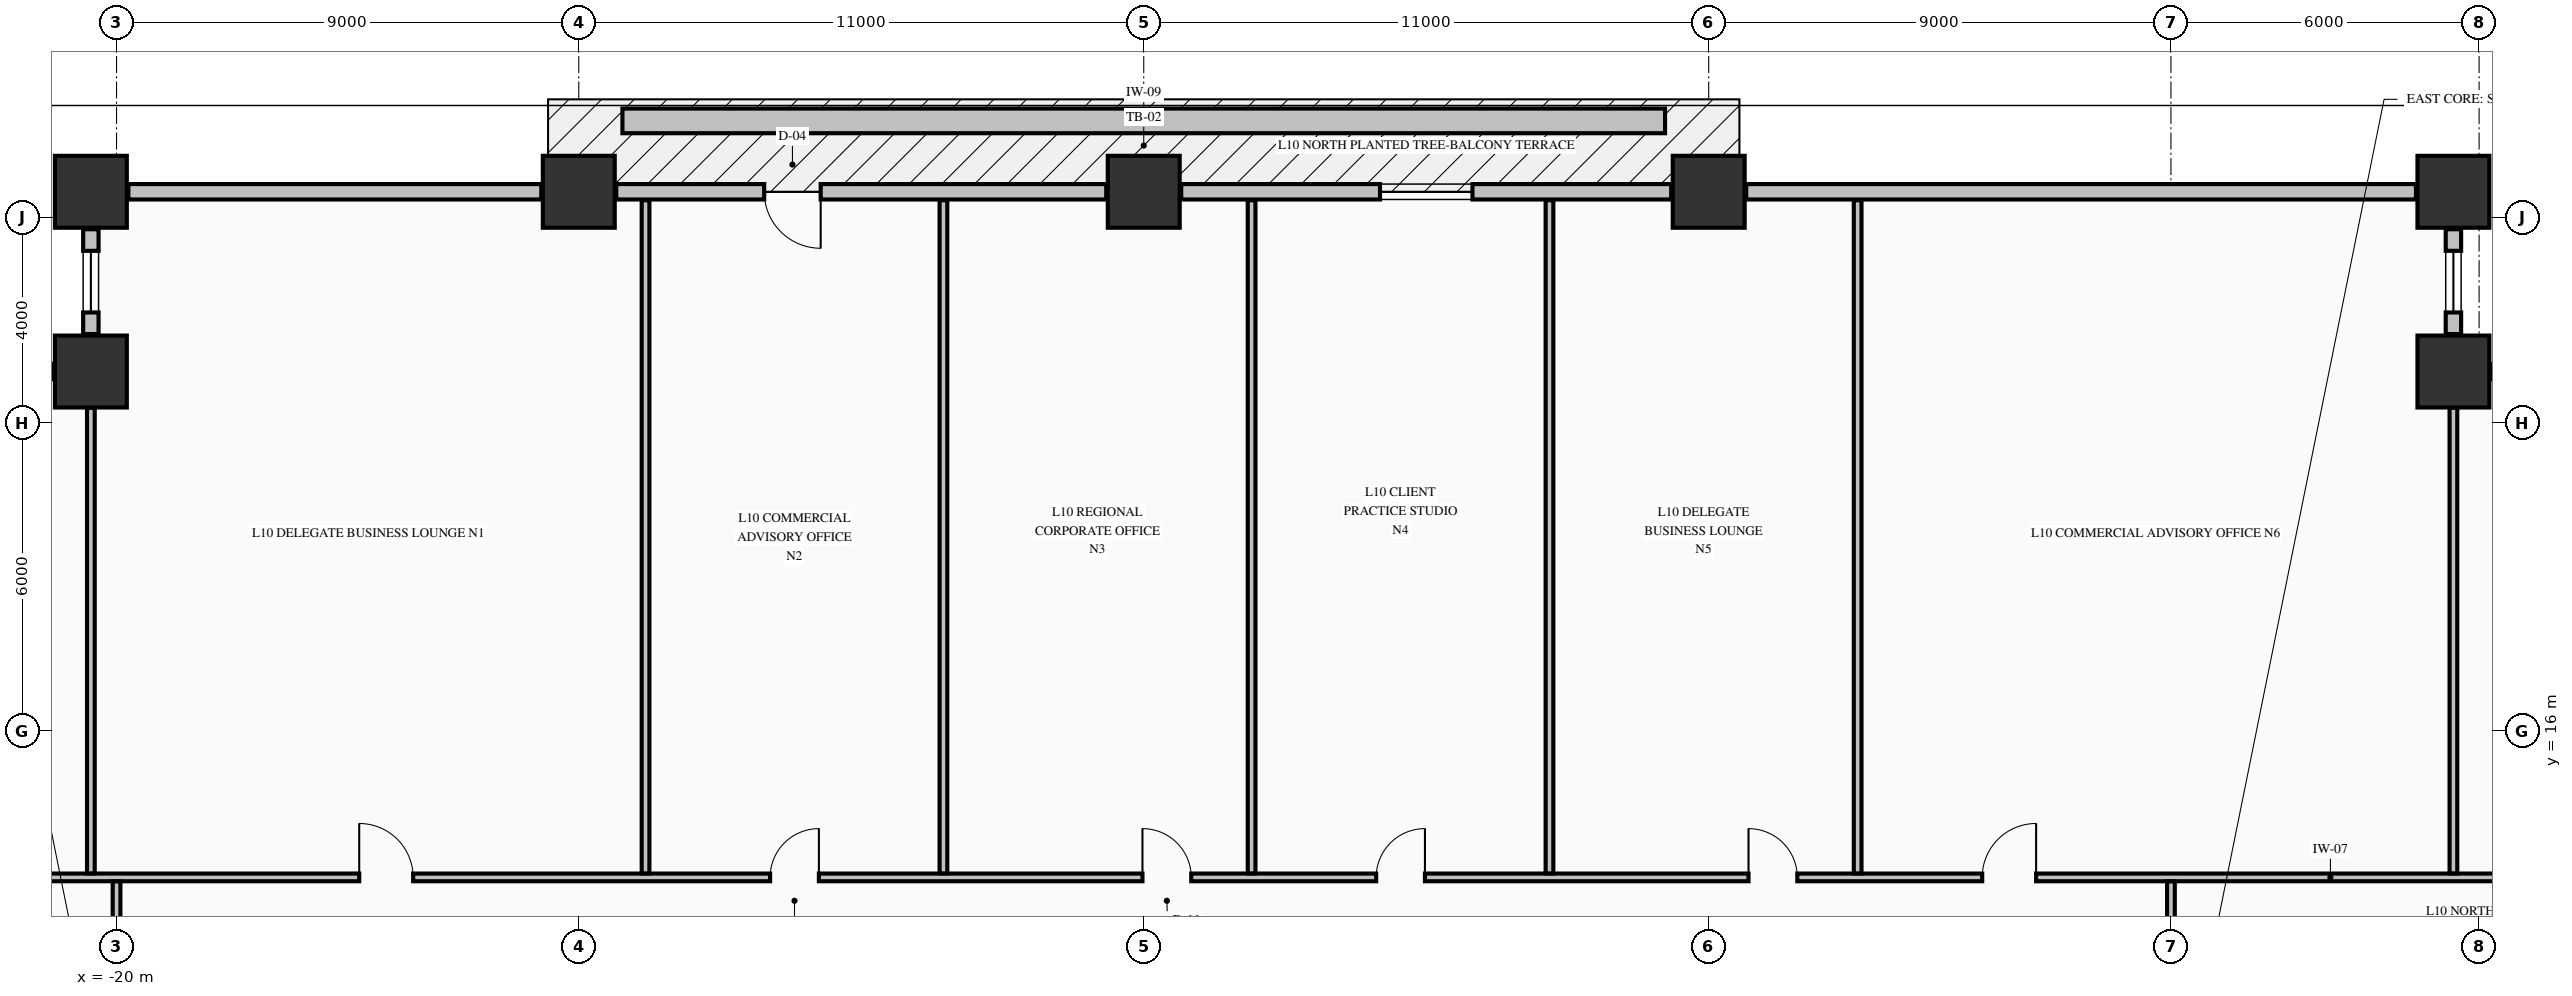
"""IFC4 building model, lengths in metres.
Left out: names, types, materials, properties, quantities, classifications, styles, units other than length and angle.
Written with IfcOpenShell. Run it as: python <this file> out.ifc"""

import sys

from ifc_helpers import new_model, si_unit, direction, frame, frame_2d, origin, origin_2d, place, context, subcontext, project, spatial, rectangle, extrude, element, fill, save


model = new_model("IFC4")
c1 = context("Model", 3, precision=1e-05, world=origin(), true_north=direction((0.0, 1.0)))
c2 = subcontext(c1, "Body", "Model", "MODEL_VIEW")
j1 = project(units=[si_unit("LENGTHUNIT", "METRE"), si_unit("PLANEANGLEUNIT", "RADIAN")], contexts=[c1])
p1 = place(None, origin())
s1 = spatial("IfcSite", under=j1, at=p1, CompositionType="ELEMENT")
p2 = place(p1, origin())
s2 = spatial("IfcBuilding", under=s1, at=p2, CompositionType="ELEMENT")
p3 = place(p2, frame((0.0, 0.0, 45.05)))
s3 = spatial("IfcBuildingStorey", under=s2, at=p3, CompositionType="ELEMENT", Elevation=45.05)
for number, where, z_axis, x_axis in (
    (1, (-20.5, 26.5, -0.25), (0.0, 0.0, 1.0), (1.0, 0.0, 0.0)),
    (2, (-11.0, 26.5, -0.25), (0.0, 0.0, 1.0), (1.0, 0.0, 0.0)),
    (3, (0.0, 26.5, -0.25), (0.0, 0.0, 1.0), (1.0, 0.0, 0.0)),
    (4, (11.0, 26.5, -0.25), (0.0, 0.0, 1.0), (1.0, 0.0, 0.0)),
    (5, (25.5, 26.5, -0.25), (0.0, 0.0, 1.0), (1.0, 0.0, 0.0)),
    (6, (25.5, 23.0, -0.25), (0.0, 0.0, 1.0), (1.0, 0.0, 0.0)),
    (7, (-20.5, 23.0, -0.25), (0.0, 0.0, 1.0), (1.0, 0.0, 0.0)),
):
    element("IfcColumn", number, at=place(p3, frame(where, z_axis=z_axis, x_axis=x_axis)), inside=s3, PredefinedType="COLUMN", context=c2, shape_type="SweptSolid", body=[
        extrude(rectangle(XDim=1.4, YDim=1.4, at=origin_2d()), origin(), (0.0, 0.0, 1.0), 3.57),
    ])
p4 = place(p3, frame((28.27, 23.0, 0.0), z_axis=(0.0, 0.0, 1.0), x_axis=(-1.0, 0.0, 0.0)))
e8 = element("IfcWall", 8, at=p4, inside=s3, PredefinedType="STANDARD", context=c2, shape_type="SweptSolid", body=[
    extrude(rectangle(XDim=2.04, YDim=0.3, at=frame_2d((1.02, 0.0))), origin(), (0.0, 0.0, 1.0), 2.712),
])
p5 = place(p4, frame((0.42, 0.0, 0.82)))
e9 = element("IfcOpeningElement", 9, at=p5, cuts=e8, PredefinedType="OPENING", context=c2, shape_type="SweptSolid", body=[
    extrude(rectangle(XDim=1.2, YDim=1.65, at=frame_2d((0.6, 0.825))), frame((0.0, 0.16, 0.0), z_axis=(0.0, -1.0, 0.0), x_axis=(1.0, 0.0, 0.0)), (0.0, 0.0, 1.0), 0.32),
])
p6 = place(p3, frame((25.5, 23.73, 0.0), z_axis=(0.0, 0.0, 1.0), x_axis=(0.0, 1.0, 0.0)))
e10 = element("IfcWall", 10, at=p6, inside=s3, PredefinedType="STANDARD", context=c2, shape_type="SweptSolid", body=[
    extrude(rectangle(XDim=2.04, YDim=0.3, at=frame_2d((1.02, 0.0))), origin(), (0.0, 0.0, 1.0), 2.712),
])
p7 = place(p6, frame((0.42, 0.0, 0.82)))
e11 = element("IfcOpeningElement", 11, at=p7, cuts=e10, PredefinedType="OPENING", context=c2, shape_type="SweptSolid", body=[
    extrude(rectangle(XDim=1.2, YDim=1.65, at=frame_2d((0.6, 0.825))), frame((0.0, 0.16, 0.0), z_axis=(0.0, -1.0, 0.0), x_axis=(1.0, 0.0, 0.0)), (0.0, 0.0, 1.0), 0.32),
])
p8 = place(p3, frame((-20.5, 25.77, 0.0), z_axis=(0.0, 0.0, 1.0), x_axis=(0.0, -1.0, 0.0)))
e12 = element("IfcWall", 12, at=p8, inside=s3, PredefinedType="STANDARD", context=c2, shape_type="SweptSolid", body=[
    extrude(rectangle(XDim=2.04, YDim=0.3, at=frame_2d((1.02, 0.0))), origin(), (0.0, 0.0, 1.0), 2.712),
])
p9 = place(p8, frame((0.42, 0.0, 0.82)))
e13 = element("IfcOpeningElement", 13, at=p9, cuts=e12, PredefinedType="OPENING", context=c2, shape_type="SweptSolid", body=[
    extrude(rectangle(XDim=1.2, YDim=1.65, at=frame_2d((0.6, 0.825))), frame((0.0, 0.16, 0.0), z_axis=(0.0, -1.0, 0.0), x_axis=(1.0, 0.0, 0.0)), (0.0, 0.0, 1.0), 0.32),
])
p10 = place(p3, frame((-21.23, 23.0, 0.0), z_axis=(0.0, 0.0, 1.0), x_axis=(-1.0, 0.0, 0.0)))
e14 = element("IfcWall", 14, at=p10, inside=s3, PredefinedType="STANDARD", context=c2, shape_type="SweptSolid", body=[
    extrude(rectangle(XDim=2.04, YDim=0.3, at=frame_2d((1.02, 0.0))), origin(), (0.0, 0.0, 1.0), 2.712),
])
p11 = place(p10, frame((0.42, 0.0, 0.82)))
e15 = element("IfcOpeningElement", 15, at=p11, cuts=e14, PredefinedType="OPENING", context=c2, shape_type="SweptSolid", body=[
    extrude(rectangle(XDim=1.2, YDim=1.65, at=frame_2d((0.6, 0.825))), frame((0.0, 0.16, 0.0), z_axis=(0.0, -1.0, 0.0), x_axis=(1.0, 0.0, 0.0)), (0.0, 0.0, 1.0), 0.32),
])
p12 = place(p3, frame((-11.73, 26.5, 0.0), z_axis=(0.0, 0.0, 1.0), x_axis=(-1.0, 0.0, 0.0)))
e16 = element("IfcWall", 16, at=p12, inside=s3, PredefinedType="STANDARD", context=c2, shape_type="SweptSolid", body=[
    extrude(rectangle(XDim=8.04, YDim=0.3, at=frame_2d((4.02, 0.0))), origin(), (0.0, 0.0, 1.0), 2.712),
])
p13 = place(p3, frame((-0.73, 26.5, 0.0), z_axis=(0.0, 0.0, 1.0), x_axis=(-1.0, 0.0, 0.0)))
e17 = element("IfcWall", 17, at=p13, inside=s3, PredefinedType="STANDARD", context=c2, shape_type="SweptSolid", body=[
    extrude(rectangle(XDim=9.54, YDim=0.3, at=frame_2d((4.77, 0.0))), origin(), (0.0, 0.0, 1.0), 2.712),
])
p14 = place(p13, frame((5.56, 0.0, 0.0)))
e18 = element("IfcOpeningElement", 18, at=p14, cuts=e17, PredefinedType="OPENING", context=c2, shape_type="SweptSolid", body=[
    extrude(rectangle(XDim=1.1, YDim=2.15, at=frame_2d((0.55, 1.075))), frame((0.0, 0.16, 0.0), z_axis=(0.0, -1.0, 0.0), x_axis=(1.0, 0.0, 0.0)), (0.0, 0.0, 1.0), 0.32),
])
p15 = place(p3, frame((10.27, 26.5, 0.0), z_axis=(0.0, 0.0, 1.0), x_axis=(-1.0, 0.0, 0.0)))
e19 = element("IfcWall", 19, at=p15, inside=s3, PredefinedType="STANDARD", context=c2, shape_type="SweptSolid", body=[
    extrude(rectangle(XDim=9.54, YDim=0.3, at=frame_2d((4.77, 0.0))), origin(), (0.0, 0.0, 1.0), 2.712),
])
p16 = place(p15, frame((3.87, 0.0, 0.78)))
e20 = element("IfcOpeningElement", 20, at=p16, cuts=e19, PredefinedType="OPENING", context=c2, shape_type="SweptSolid", body=[
    extrude(rectangle(XDim=1.8, YDim=1.72, at=frame_2d((0.9, 0.86))), frame((0.0, 0.16, 0.0), z_axis=(0.0, -1.0, 0.0), x_axis=(1.0, 0.0, 0.0)), (0.0, 0.0, 1.0), 0.32),
])
p17 = place(p3, frame((24.77, 26.5, 0.0), z_axis=(0.0, 0.0, 1.0), x_axis=(-1.0, 0.0, 0.0)))
e21 = element("IfcWall", 21, at=p17, inside=s3, PredefinedType="STANDARD", context=c2, shape_type="SweptSolid", body=[
    extrude(rectangle(XDim=13.04, YDim=0.3, at=frame_2d((6.52, 0.0))), origin(), (0.0, 0.0, 1.0), 2.712),
])
p18 = place(p3, frame((-23.835, 13.15, 0.0), z_axis=(0.0, 0.0, 1.0), x_axis=(1.0, 0.0, 0.0)))
e22 = element("IfcWall", 22, at=p18, inside=s3, PredefinedType="PARTITIONING", context=c2, shape_type="SweptSolid", body=[
    extrude(rectangle(XDim=52.67, YDim=0.15, at=frame_2d((26.335, 0.0))), origin(), (0.0, 0.0, 1.0), 3.32),
])
p19 = place(p18, frame((8.56, 0.0, 0.0)))
e23 = element("IfcOpeningElement", 23, at=p19, cuts=e22, PredefinedType="OPENING", context=c2, shape_type="SweptSolid", body=[
    extrude(rectangle(XDim=1.05, YDim=2.15, at=frame_2d((0.525, 1.075))), frame((0.0, 0.085, 0.0), z_axis=(0.0, -1.0, 0.0), x_axis=(1.0, 0.0, 0.0)), (0.0, 0.0, 1.0), 0.17),
])
p20 = place(p18, frame((16.56, 0.0, 0.0)))
e24 = element("IfcOpeningElement", 24, at=p20, cuts=e22, PredefinedType="OPENING", context=c2, shape_type="SweptSolid", body=[
    extrude(rectangle(XDim=0.95, YDim=2.15, at=frame_2d((0.475, 1.075))), frame((0.0, 0.085, 0.0), z_axis=(0.0, -1.0, 0.0), x_axis=(1.0, 0.0, 0.0)), (0.0, 0.0, 1.0), 0.17),
])
p21 = place(p18, frame((23.81, 0.0, 0.0)))
e25 = element("IfcOpeningElement", 25, at=p21, cuts=e22, PredefinedType="OPENING", context=c2, shape_type="SweptSolid", body=[
    extrude(rectangle(XDim=0.95, YDim=2.15, at=frame_2d((0.475, 1.075))), frame((0.0, 0.085, 0.0), z_axis=(0.0, -1.0, 0.0), x_axis=(1.0, 0.0, 0.0)), (0.0, 0.0, 1.0), 0.17),
])
p22 = place(p18, frame((28.36, 0.0, 0.0)))
e26 = element("IfcOpeningElement", 26, at=p22, cuts=e22, PredefinedType="OPENING", context=c2, shape_type="SweptSolid", body=[
    extrude(rectangle(XDim=0.95, YDim=2.15, at=frame_2d((0.475, 1.075))), frame((0.0, 0.085, 0.0), z_axis=(0.0, -1.0, 0.0), x_axis=(1.0, 0.0, 0.0)), (0.0, 0.0, 1.0), 0.17),
])
p23 = place(p18, frame((35.61, 0.0, 0.0)))
e27 = element("IfcOpeningElement", 27, at=p23, cuts=e22, PredefinedType="OPENING", context=c2, shape_type="SweptSolid", body=[
    extrude(rectangle(XDim=0.95, YDim=2.15, at=frame_2d((0.475, 1.075))), frame((0.0, 0.085, 0.0), z_axis=(0.0, -1.0, 0.0), x_axis=(1.0, 0.0, 0.0)), (0.0, 0.0, 1.0), 0.17),
])
p24 = place(p18, frame((40.16, 0.0, 0.0)))
e28 = element("IfcOpeningElement", 28, at=p24, cuts=e22, PredefinedType="OPENING", context=c2, shape_type="SweptSolid", body=[
    extrude(rectangle(XDim=1.05, YDim=2.15, at=frame_2d((0.525, 1.075))), frame((0.0, 0.085, 0.0), z_axis=(0.0, -1.0, 0.0), x_axis=(1.0, 0.0, 0.0)), (0.0, 0.0, 1.0), 0.17),
])
p25 = place(p3, frame((-20.5, 13.228, 0.0), z_axis=(0.0, 0.0, 1.0), x_axis=(0.0, 1.0, 0.0)))
e29 = element("IfcWall", 29, at=p25, inside=s3, PredefinedType="PARTITIONING", context=c2, shape_type="SweptSolid", body=[
    extrude(rectangle(XDim=9.066, YDim=0.15, at=frame_2d((4.533, 0.0))), origin(), (0.0, 0.0, 1.0), 3.32),
])
p26 = place(p3, frame((-20.0, 11.106, 0.0), z_axis=(0.0, 0.0, 1.0), x_axis=(0.0, 1.0, 0.0)))
e30 = element("IfcWall", 30, at=p26, inside=s3, PredefinedType="PARTITIONING", context=c2, shape_type="SweptSolid", body=[
    extrude(rectangle(XDim=1.966, YDim=0.15, at=frame_2d((0.983, 0.0))), origin(), (0.0, 0.0, 1.0), 3.32),
])
p27 = place(p26, frame((0.239, 0.0, 0.0)))
e31 = element("IfcOpeningElement", 31, at=p27, cuts=e30, PredefinedType="OPENING", context=c2, shape_type="SweptSolid", body=[
    extrude(rectangle(XDim=0.95, YDim=2.15, at=frame_2d((0.475, 1.075))), frame((0.0, 0.085, 0.0), z_axis=(0.0, -1.0, 0.0), x_axis=(1.0, 0.0, 0.0)), (0.0, 0.0, 1.0), 0.17),
])
for number, where, z_axis, x_axis in (
    (32, (-9.7, 13.228, 0.0), (0.0, 0.0, 1.0), (0.0, 1.0, 0.0)),
    (33, (-3.9, 13.228, 0.0), (0.0, 0.0, 1.0), (0.0, 1.0, 0.0)),
    (34, (2.1, 13.228, 0.0), (0.0, 0.0, 1.0), (0.0, 1.0, 0.0)),
    (35, (7.9, 13.228, 0.0), (0.0, 0.0, 1.0), (0.0, 1.0, 0.0)),
    (36, (13.9, 13.228, 0.0), (0.0, 0.0, 1.0), (0.0, 1.0, 0.0)),
):
    element("IfcWall", number, at=place(p3, frame(where, z_axis=z_axis, x_axis=x_axis)), inside=s3, PredefinedType="PARTITIONING", context=c2, shape_type="SweptSolid", body=[
        extrude(rectangle(XDim=13.107, YDim=0.15, at=frame_2d((6.553, 0.0))), origin(), (0.0, 0.0, 1.0), 3.32),
    ])
p28 = place(p3, frame((20.0, 11.106, 0.0), z_axis=(0.0, 0.0, 1.0), x_axis=(0.0, 1.0, 0.0)))
e37 = element("IfcWall", 37, at=p28, inside=s3, PredefinedType="PARTITIONING", context=c2, shape_type="SweptSolid", body=[
    extrude(rectangle(XDim=1.966, YDim=0.15, at=frame_2d((0.983, 0.0))), origin(), (0.0, 0.0, 1.0), 2.66),
])
p29 = place(p28, frame((0.239, 0.0, 0.0)))
e38 = element("IfcOpeningElement", 38, at=p29, cuts=e37, PredefinedType="OPENING", context=c2, shape_type="SweptSolid", body=[
    extrude(rectangle(XDim=0.95, YDim=2.15, at=frame_2d((0.475, 1.075))), frame((0.0, 0.085, 0.0), z_axis=(0.0, -1.0, 0.0), x_axis=(1.0, 0.0, 0.0)), (0.0, 0.0, 1.0), 0.17),
])
p30 = place(p3, frame((25.5, 13.228, 0.0), z_axis=(0.0, 0.0, 1.0), x_axis=(0.0, 1.0, 0.0)))
e39 = element("IfcWall", 39, at=p30, inside=s3, PredefinedType="PARTITIONING", context=c2, shape_type="SweptSolid", body=[
    extrude(rectangle(XDim=9.066, YDim=0.15, at=frame_2d((4.533, 0.0))), origin(), (0.0, 0.0, 1.0), 3.32),
])
p31 = place(p3, frame((-10.15, 27.88, -0.04), z_axis=(0.0, 0.0, 1.0), x_axis=(1.0, 0.0, 0.0)))
e40 = element("IfcWall", 40, at=p31, inside=s3, PredefinedType="PARAPET", context=c2, shape_type="SweptSolid", body=[
    extrude(rectangle(XDim=20.3, YDim=0.48, at=frame_2d((10.15, 0.0))), origin(), (0.0, 0.0, 1.0), 0.52),
])
p32 = place(p7, origin())
e41 = element("IfcWindow", 41, at=p32, inside=s3, PartitioningType="SINGLE_PANEL", PredefinedType="WINDOW", context=c2, shape_type="SweptSolid", body=[
    extrude(rectangle(XDim=1.2, YDim=1.65, at=frame_2d((0.6, 0.825))), frame((0.0, 0.03, 0.0), z_axis=(0.0, -1.0, 0.0), x_axis=(1.0, 0.0, 0.0)), (0.0, 0.0, 1.0), 0.06),
])
fill(e11, e41)
p33 = place(p9, origin())
e42 = element("IfcWindow", 42, at=p33, inside=s3, PartitioningType="SINGLE_PANEL", PredefinedType="WINDOW", context=c2, shape_type="SweptSolid", body=[
    extrude(rectangle(XDim=1.2, YDim=1.65, at=frame_2d((0.6, 0.825))), frame((0.0, 0.03, 0.0), z_axis=(0.0, -1.0, 0.0), x_axis=(1.0, 0.0, 0.0)), (0.0, 0.0, 1.0), 0.06),
])
fill(e13, e42)
p34 = place(p14, origin())
e43 = element("IfcDoor", 43, at=p34, inside=s3, OperationType="SINGLE_SWING_LEFT", PredefinedType="DOOR", context=c2, shape_type="SweptSolid", body=[
    extrude(rectangle(XDim=1.1, YDim=2.15, at=frame_2d((0.55, 1.075))), frame((0.0, 0.025, 0.0), z_axis=(0.0, -1.0, 0.0), x_axis=(1.0, 0.0, 0.0)), (0.0, 0.0, 1.0), 0.05),
])
fill(e18, e43)
p35 = place(p16, origin())
e44 = element("IfcWindow", 44, at=p35, inside=s3, PartitioningType="SINGLE_PANEL", PredefinedType="WINDOW", context=c2, shape_type="SweptSolid", body=[
    extrude(rectangle(XDim=1.8, YDim=1.72, at=frame_2d((0.9, 0.86))), frame((0.0, 0.03, 0.0), z_axis=(0.0, -1.0, 0.0), x_axis=(1.0, 0.0, 0.0)), (0.0, 0.0, 1.0), 0.06),
])
fill(e20, e44)
p36 = place(p19, origin())
e45 = element("IfcDoor", 45, at=p36, inside=s3, OperationType="SINGLE_SWING_LEFT", PredefinedType="DOOR", context=c2, shape_type="SweptSolid", body=[
    extrude(rectangle(XDim=1.05, YDim=2.15, at=frame_2d((0.525, 1.075))), frame((0.0, 0.025, 0.0), z_axis=(0.0, -1.0, 0.0), x_axis=(1.0, 0.0, 0.0)), (0.0, 0.0, 1.0), 0.05),
])
fill(e23, e45)
p37 = place(p20, origin())
e46 = element("IfcDoor", 46, at=p37, inside=s3, OperationType="SINGLE_SWING_RIGHT", PredefinedType="DOOR", context=c2, shape_type="SweptSolid", body=[
    extrude(rectangle(XDim=0.95, YDim=2.15, at=frame_2d((0.475, 1.075))), frame((0.0, 0.025, 0.0), z_axis=(0.0, -1.0, 0.0), x_axis=(1.0, 0.0, 0.0)), (0.0, 0.0, 1.0), 0.05),
])
fill(e24, e46)
p38 = place(p21, origin())
e47 = element("IfcDoor", 47, at=p38, inside=s3, OperationType="SINGLE_SWING_LEFT", PredefinedType="DOOR", context=c2, shape_type="SweptSolid", body=[
    extrude(rectangle(XDim=0.95, YDim=2.15, at=frame_2d((0.475, 1.075))), frame((0.0, 0.025, 0.0), z_axis=(0.0, -1.0, 0.0), x_axis=(1.0, 0.0, 0.0)), (0.0, 0.0, 1.0), 0.05),
])
fill(e25, e47)
p39 = place(p22, origin())
e48 = element("IfcDoor", 48, at=p39, inside=s3, OperationType="SINGLE_SWING_RIGHT", PredefinedType="DOOR", context=c2, shape_type="SweptSolid", body=[
    extrude(rectangle(XDim=0.95, YDim=2.15, at=frame_2d((0.475, 1.075))), frame((0.0, 0.025, 0.0), z_axis=(0.0, -1.0, 0.0), x_axis=(1.0, 0.0, 0.0)), (0.0, 0.0, 1.0), 0.05),
])
fill(e26, e48)
p40 = place(p23, origin())
e49 = element("IfcDoor", 49, at=p40, inside=s3, OperationType="SINGLE_SWING_LEFT", PredefinedType="DOOR", context=c2, shape_type="SweptSolid", body=[
    extrude(rectangle(XDim=0.95, YDim=2.15, at=frame_2d((0.475, 1.075))), frame((0.0, 0.025, 0.0), z_axis=(0.0, -1.0, 0.0), x_axis=(1.0, 0.0, 0.0)), (0.0, 0.0, 1.0), 0.05),
])
fill(e27, e49)
p41 = place(p24, origin())
e50 = element("IfcDoor", 50, at=p41, inside=s3, OperationType="SINGLE_SWING_RIGHT", PredefinedType="DOOR", context=c2, shape_type="SweptSolid", body=[
    extrude(rectangle(XDim=1.05, YDim=2.15, at=frame_2d((0.525, 1.075))), frame((0.0, 0.025, 0.0), z_axis=(0.0, -1.0, 0.0), x_axis=(1.0, 0.0, 0.0)), (0.0, 0.0, 1.0), 0.05),
])
fill(e28, e50)
save(model, sys.argv[1])
